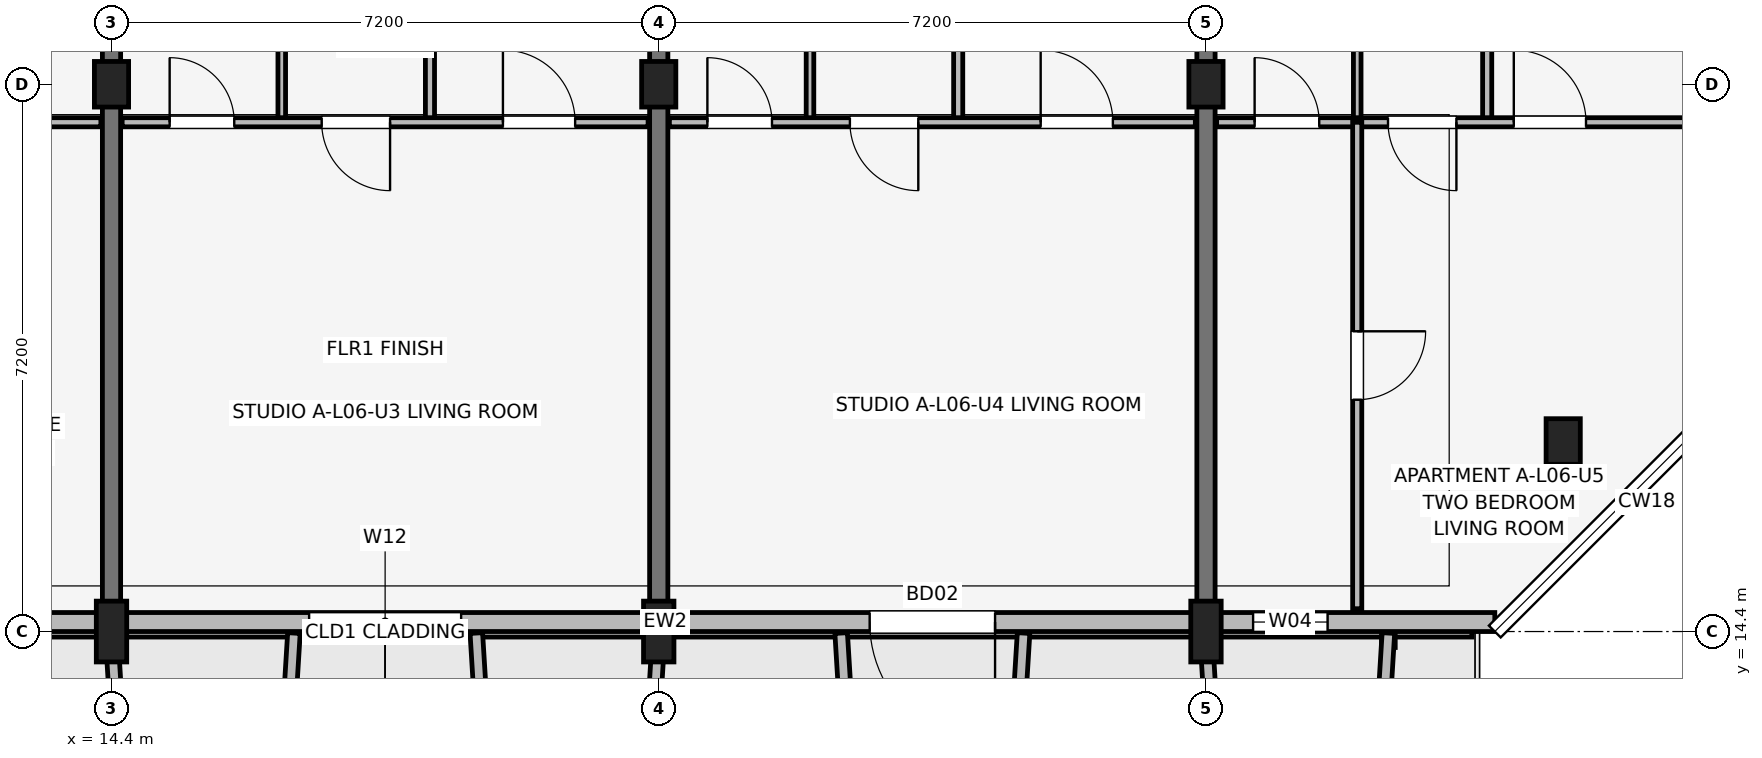
"""IFC4 building model, lengths in metres.
Left out: names, types, materials, properties, quantities, classifications, styles, units other than length and angle.
Written with IfcOpenShell. Run it as: python <this file> out.ifc"""

import sys

from ifc_helpers import new_model, si_unit, direction, frame, frame_2d, origin, origin_2d, place, context, subcontext, project, spatial, rectangle, extrude, element, fill, save


model = new_model("IFC4")
c1 = context("Model", 3, precision=1e-05, world=origin(), true_north=direction((0.0, 1.0)))
c2 = subcontext(c1, "Body", "Model", "MODEL_VIEW")
j1 = project(units=[si_unit("LENGTHUNIT", "METRE"), si_unit("PLANEANGLEUNIT", "RADIAN")], contexts=[c1])
p1 = place(None, origin())
s1 = spatial("IfcSite", under=j1, at=p1, CompositionType="ELEMENT")
p2 = place(p1, origin())
s2 = spatial("IfcBuilding", under=s1, at=p2, CompositionType="ELEMENT")
p3 = place(p2, frame((0.0, 0.0, 21.3)))
s3 = spatial("IfcBuildingStorey", under=s2, at=p3, CompositionType="ELEMENT", Elevation=21.3)
p4 = place(p3, frame((14.4, 14.4, 0.0), z_axis=(0.0, 0.0, 1.0), x_axis=(1.0, 0.0, 0.0)))
e1 = element("IfcColumn", 1, at=p4, inside=s3, PredefinedType="COLUMN", context=c2, shape_type="SweptSolid", body=[
    extrude(rectangle(XDim=0.4, YDim=0.8, at=origin_2d()), origin(), (0.0, 0.0, 1.0), 3.15),
])
p5 = place(p3, frame((14.4, 21.6, 0.0), z_axis=(0.0, 0.0, 1.0), x_axis=(1.0, 0.0, 0.0)))
e2 = element("IfcColumn", 2, at=p5, inside=s3, PredefinedType="COLUMN", context=c2, shape_type="SweptSolid", body=[
    extrude(rectangle(XDim=0.45, YDim=0.6, at=origin_2d()), origin(), (0.0, 0.0, 1.0), 3.15),
])
p6 = place(p3, frame((21.6, 14.4, 0.0), z_axis=(0.0, 0.0, 1.0), x_axis=(1.0, 0.0, 0.0)))
e3 = element("IfcColumn", 3, at=p6, inside=s3, PredefinedType="COLUMN", context=c2, shape_type="SweptSolid", body=[
    extrude(rectangle(XDim=0.4, YDim=0.8, at=origin_2d()), origin(), (0.0, 0.0, 1.0), 3.15),
])
p7 = place(p3, frame((21.6, 21.6, 0.0), z_axis=(0.0, 0.0, 1.0), x_axis=(1.0, 0.0, 0.0)))
e4 = element("IfcColumn", 4, at=p7, inside=s3, PredefinedType="COLUMN", context=c2, shape_type="SweptSolid", body=[
    extrude(rectangle(XDim=0.45, YDim=0.6, at=origin_2d()), origin(), (0.0, 0.0, 1.0), 3.15),
])
p8 = place(p3, frame((28.8, 14.4, 0.0), z_axis=(0.0, 0.0, 1.0), x_axis=(1.0, 0.0, 0.0)))
e5 = element("IfcColumn", 5, at=p8, inside=s3, PredefinedType="COLUMN", context=c2, shape_type="SweptSolid", body=[
    extrude(rectangle(XDim=0.4, YDim=0.8, at=origin_2d()), origin(), (0.0, 0.0, 1.0), 3.15),
])
for number, where, z_axis, x_axis in (
    (6, (28.8, 21.6, 0.0), (0.0, 0.0, 1.0), (1.0, 0.0, 0.0)),
    (7, (33.5, 16.9, 0.0), (0.0, 0.0, 1.0), (1.0, 0.0, 0.0)),
):
    element("IfcColumn", number, at=place(p3, frame(where, z_axis=z_axis, x_axis=x_axis)), inside=s3, PredefinedType="COLUMN", context=c2, shape_type="SweptSolid", body=[
        extrude(rectangle(XDim=0.45, YDim=0.6, at=origin_2d()), origin(), (0.0, 0.0, 1.0), 3.15),
    ])
for number, where, z_axis, x_axis in (
    (8, (14.4, 14.75, 0.0), (0.0, 0.0, 1.0), (0.0, 1.0, 0.0)),
    (9, (21.6, 14.75, 0.0), (0.0, 0.0, 1.0), (0.0, 1.0, 0.0)),
    (10, (28.8, 14.75, 0.0), (0.0, 0.0, 1.0), (0.0, 1.0, 0.0)),
):
    element("IfcWall", number, at=place(p3, frame(where, z_axis=z_axis, x_axis=x_axis)), inside=s3, PredefinedType="SHEAR", context=c2, shape_type="SweptSolid", body=[
        extrude(rectangle(XDim=9.4, YDim=0.24, at=frame_2d((4.7, 0.0))), origin(), (0.0, 0.0, 1.0), 3.15),
    ])
p9 = place(p3, frame((3.4, 14.525, 0.0), z_axis=(0.0, 0.0, 1.0), x_axis=(1.0, 0.0, 0.0)))
e11 = element("IfcWall", 11, at=p9, inside=s3, PredefinedType="SOLIDWALL", context=c2, shape_type="SweptSolid", body=[
    extrude(rectangle(XDim=29.2, YDim=0.25, at=frame_2d((14.6, 0.0))), origin(), (0.0, 0.0, 1.0), 2.43),
])
p10 = place(p9, frame((8.3, 0.0, 0.0), z_axis=(0.0, 0.0, 1.0), x_axis=(-1.0, 0.0, 0.0)))
e12 = element("IfcOpeningElement", 12, at=p10, cuts=e11, PredefinedType="OPENING", context=c2, shape_type="SweptSolid", body=[
    extrude(rectangle(XDim=1.8, YDim=2.15, at=frame_2d((0.9, 1.075))), frame((0.0, 0.135, 0.0), z_axis=(0.0, -1.0, 0.0), x_axis=(1.0, 0.0, 0.0)), (0.0, 0.0, 1.0), 0.27),
])
p11 = place(p9, frame((22.625, 0.0, 0.0), z_axis=(0.0, 0.0, 1.0), x_axis=(-1.0, 0.0, 0.0)))
e13 = element("IfcOpeningElement", 13, at=p11, cuts=e11, PredefinedType="OPENING", context=c2, shape_type="SweptSolid", body=[
    extrude(rectangle(XDim=1.65, YDim=2.15, at=frame_2d((0.825, 1.075))), frame((0.0, 0.135, 0.0), z_axis=(0.0, -1.0, 0.0), x_axis=(1.0, 0.0, 0.0)), (0.0, 0.0, 1.0), 0.27),
])
p12 = place(p9, frame((1.62, 0.0, 0.7)))
e14 = element("IfcOpeningElement", 14, at=p12, cuts=e11, PredefinedType="OPENING", context=c2, shape_type="SweptSolid", body=[
    extrude(rectangle(XDim=1.72, YDim=1.6, at=frame_2d((0.86, 0.8))), frame((0.0, 0.135, 0.0), z_axis=(0.0, -1.0, 0.0), x_axis=(1.0, 0.0, 0.0)), (0.0, 0.0, 1.0), 0.27),
])
p13 = place(p9, frame((4.675, 0.0, 0.75)))
e15 = element("IfcOpeningElement", 15, at=p13, cuts=e11, PredefinedType="OPENING", context=c2, shape_type="SweptSolid", body=[
    extrude(rectangle(XDim=0.72, YDim=1.35, at=frame_2d((0.36, 0.675))), frame((0.0, 0.135, 0.0), z_axis=(0.0, -1.0, 0.0), x_axis=(1.0, 0.0, 0.0)), (0.0, 0.0, 1.0), 0.27),
])
p14 = place(p9, frame((13.6, 0.0, 0.67)))
e16 = element("IfcOpeningElement", 16, at=p14, cuts=e11, PredefinedType="OPENING", context=c2, shape_type="SweptSolid", body=[
    extrude(rectangle(XDim=2.0, YDim=1.65, at=frame_2d((1.0, 0.825))), frame((0.0, 0.135, 0.0), z_axis=(0.0, -1.0, 0.0), x_axis=(1.0, 0.0, 0.0)), (0.0, 0.0, 1.0), 0.27),
])
p15 = place(p9, frame((26.02, 0.0, 0.75)))
e17 = element("IfcOpeningElement", 17, at=p15, cuts=e11, PredefinedType="OPENING", context=c2, shape_type="SweptSolid", body=[
    extrude(rectangle(XDim=0.98, YDim=1.45, at=frame_2d((0.49, 0.725))), frame((0.0, 0.135, 0.0), z_axis=(0.0, -1.0, 0.0), x_axis=(1.0, 0.0, 0.0)), (0.0, 0.0, 1.0), 0.27),
])
for number, where, z_axis, x_axis in (
    (18, (14.4, 14.38, 0.0), (0.0, 0.0, 1.0), (0.061, -0.998, 0.0)),
    (19, (16.8, 14.38, 0.0), (0.0, 0.0, 1.0), (-0.061, -0.998, 0.0)),
    (20, (19.2, 14.38, 0.0), (0.0, 0.0, 1.0), (0.061, -0.998, 0.0)),
    (21, (21.6, 14.38, 0.0), (0.0, 0.0, 1.0), (-0.061, -0.998, 0.0)),
):
    element("IfcWall", number, at=place(p3, frame(where, z_axis=z_axis, x_axis=x_axis)), inside=s3, PredefinedType="ELEMENTEDWALL", context=c2, shape_type="SweptSolid", body=[
        extrude(rectangle(XDim=1.964, YDim=0.165, at=frame_2d((0.982, 0.0))), origin(), (0.0, 0.0, 1.0), 2.53),
    ])
for number, where, z_axis, x_axis in (
    (22, (24.0, 14.38, 0.0), (0.0, 0.0, 1.0), (0.061, -0.998, 0.0)),
    (23, (26.4, 14.38, 0.0), (0.0, 0.0, 1.0), (-0.061, -0.998, 0.0)),
):
    element("IfcWall", number, at=place(p3, frame(where, z_axis=z_axis, x_axis=x_axis)), inside=s3, PredefinedType="ELEMENTEDWALL", context=c2, shape_type="SweptSolid", body=[
        extrude(rectangle(XDim=1.964, YDim=0.165, at=frame_2d((0.982, 0.0))), origin(), (0.0, 0.0, 1.0), 2.55),
    ])
for number, where, z_axis, x_axis in (
    (24, (28.8, 14.38, 0.0), (0.0, 0.0, 1.0), (0.061, -0.998, 0.0)),
    (25, (31.2, 14.38, 0.0), (0.0, 0.0, 1.0), (-0.061, -0.998, 0.0)),
):
    element("IfcWall", number, at=place(p3, frame(where, z_axis=z_axis, x_axis=x_axis)), inside=s3, PredefinedType="ELEMENTEDWALL", context=c2, shape_type="SweptSolid", body=[
        extrude(rectangle(XDim=1.964, YDim=0.165, at=frame_2d((0.982, 0.0))), origin(), (0.0, 0.0, 1.0), 2.95),
    ])
p16 = place(p3, frame((7.34, 21.1, 0.0), z_axis=(0.0, 0.0, 1.0), x_axis=(1.0, 0.0, 0.0)))
e26 = element("IfcWall", 26, at=p16, inside=s3, PredefinedType="PARTITIONING", context=c2, shape_type="SweptSolid", body=[
    extrude(rectangle(XDim=6.92, YDim=0.12, at=frame_2d((3.46, 0.0))), origin(), (0.0, 0.0, 1.0), 2.38),
])
p17 = place(p16, frame((1.475, 0.0, 0.0), z_axis=(0.0, 0.0, 1.0), x_axis=(-1.0, 0.0, 0.0)))
e27 = element("IfcOpeningElement", 27, at=p17, cuts=e26, PredefinedType="OPENING", context=c2, shape_type="SweptSolid", body=[
    extrude(rectangle(XDim=0.85, YDim=2.08, at=frame_2d((0.425, 1.04))), frame((0.0, 0.07, 0.0), z_axis=(0.0, -1.0, 0.0), x_axis=(1.0, 0.0, 0.0)), (0.0, 0.0, 1.0), 0.14),
])
p18 = place(p16, frame((2.775, 0.0, 0.0)))
e28 = element("IfcOpeningElement", 28, at=p18, cuts=e26, PredefinedType="OPENING", context=c2, shape_type="SweptSolid", body=[
    extrude(rectangle(XDim=0.9, YDim=2.08, at=frame_2d((0.45, 1.04))), frame((0.0, 0.07, 0.0), z_axis=(0.0, -1.0, 0.0), x_axis=(1.0, 0.0, 0.0)), (0.0, 0.0, 1.0), 0.14),
])
p19 = place(p16, frame((6.11, 0.0, 0.0), z_axis=(0.0, 0.0, 1.0), x_axis=(-1.0, 0.0, 0.0)))
e29 = element("IfcOpeningElement", 29, at=p19, cuts=e26, PredefinedType="OPENING", context=c2, shape_type="SweptSolid", body=[
    extrude(rectangle(XDim=0.95, YDim=2.08, at=frame_2d((0.475, 1.04))), frame((0.0, 0.07, 0.0), z_axis=(0.0, -1.0, 0.0), x_axis=(1.0, 0.0, 0.0)), (0.0, 0.0, 1.0), 0.14),
])
p20 = place(p3, frame((16.64, 21.1, 0.0), z_axis=(0.0, 0.0, 1.0), x_axis=(0.0, 1.0, 0.0)))
e30 = element("IfcWall", 30, at=p20, inside=s3, PredefinedType="PARTITIONING", context=c2, shape_type="SweptSolid", body=[
    extrude(rectangle(XDim=3.2, YDim=0.1, at=frame_2d((1.6, 0.0))), origin(), (0.0, 0.0, 1.0), 2.38),
])
p21 = place(p3, frame((18.59, 21.1, 0.0), z_axis=(0.0, 0.0, 1.0), x_axis=(0.0, 1.0, 0.0)))
e31 = element("IfcWall", 31, at=p21, inside=s3, PredefinedType="PARTITIONING", context=c2, shape_type="SweptSolid", body=[
    extrude(rectangle(XDim=3.2, YDim=0.12, at=frame_2d((1.6, 0.0))), origin(), (0.0, 0.0, 1.0), 2.38),
])
p22 = place(p3, frame((14.54, 21.1, 0.0), z_axis=(0.0, 0.0, 1.0), x_axis=(1.0, 0.0, 0.0)))
e32 = element("IfcWall", 32, at=p22, inside=s3, PredefinedType="PARTITIONING", context=c2, shape_type="SweptSolid", body=[
    extrude(rectangle(XDim=6.92, YDim=0.12, at=frame_2d((3.46, 0.0))), origin(), (0.0, 0.0, 1.0), 2.38),
])
p23 = place(p22, frame((0.625, 0.0, 0.0)))
e33 = element("IfcOpeningElement", 33, at=p23, cuts=e32, PredefinedType="OPENING", context=c2, shape_type="SweptSolid", body=[
    extrude(rectangle(XDim=0.85, YDim=2.08, at=frame_2d((0.425, 1.04))), frame((0.0, 0.07, 0.0), z_axis=(0.0, -1.0, 0.0), x_axis=(1.0, 0.0, 0.0)), (0.0, 0.0, 1.0), 0.14),
])
p24 = place(p22, frame((3.525, 0.0, 0.0), z_axis=(0.0, 0.0, 1.0), x_axis=(-1.0, 0.0, 0.0)))
e34 = element("IfcOpeningElement", 34, at=p24, cuts=e32, PredefinedType="OPENING", context=c2, shape_type="SweptSolid", body=[
    extrude(rectangle(XDim=0.9, YDim=2.08, at=frame_2d((0.45, 1.04))), frame((0.0, 0.07, 0.0), z_axis=(0.0, -1.0, 0.0), x_axis=(1.0, 0.0, 0.0)), (0.0, 0.0, 1.0), 0.14),
])
p25 = place(p22, frame((5.01, 0.0, 0.0)))
e35 = element("IfcOpeningElement", 35, at=p25, cuts=e32, PredefinedType="OPENING", context=c2, shape_type="SweptSolid", body=[
    extrude(rectangle(XDim=0.95, YDim=2.08, at=frame_2d((0.475, 1.04))), frame((0.0, 0.07, 0.0), z_axis=(0.0, -1.0, 0.0), x_axis=(1.0, 0.0, 0.0)), (0.0, 0.0, 1.0), 0.14),
])
p26 = place(p3, frame((23.59, 21.1, 0.0), z_axis=(0.0, 0.0, 1.0), x_axis=(0.0, 1.0, 0.0)))
e36 = element("IfcWall", 36, at=p26, inside=s3, PredefinedType="PARTITIONING", context=c2, shape_type="SweptSolid", body=[
    extrude(rectangle(XDim=3.2, YDim=0.1, at=frame_2d((1.6, 0.0))), origin(), (0.0, 0.0, 1.0), 2.38),
])
p27 = place(p3, frame((25.54, 21.1, 0.0), z_axis=(0.0, 0.0, 1.0), x_axis=(0.0, 1.0, 0.0)))
e37 = element("IfcWall", 37, at=p27, inside=s3, PredefinedType="PARTITIONING", context=c2, shape_type="SweptSolid", body=[
    extrude(rectangle(XDim=3.2, YDim=0.12, at=frame_2d((1.6, 0.0))), origin(), (0.0, 0.0, 1.0), 2.38),
])
p28 = place(p3, frame((21.74, 21.1, 0.0), z_axis=(0.0, 0.0, 1.0), x_axis=(1.0, 0.0, 0.0)))
e38 = element("IfcWall", 38, at=p28, inside=s3, PredefinedType="PARTITIONING", context=c2, shape_type="SweptSolid", body=[
    extrude(rectangle(XDim=6.92, YDim=0.12, at=frame_2d((3.46, 0.0))), origin(), (0.0, 0.0, 1.0), 2.38),
])
p29 = place(p28, frame((0.5, 0.0, 0.0)))
e39 = element("IfcOpeningElement", 39, at=p29, cuts=e38, PredefinedType="OPENING", context=c2, shape_type="SweptSolid", body=[
    extrude(rectangle(XDim=0.85, YDim=2.08, at=frame_2d((0.425, 1.04))), frame((0.0, 0.07, 0.0), z_axis=(0.0, -1.0, 0.0), x_axis=(1.0, 0.0, 0.0)), (0.0, 0.0, 1.0), 0.14),
])
p30 = place(p28, frame((3.275, 0.0, 0.0), z_axis=(0.0, 0.0, 1.0), x_axis=(-1.0, 0.0, 0.0)))
e40 = element("IfcOpeningElement", 40, at=p30, cuts=e38, PredefinedType="OPENING", context=c2, shape_type="SweptSolid", body=[
    extrude(rectangle(XDim=0.9, YDim=2.08, at=frame_2d((0.45, 1.04))), frame((0.0, 0.07, 0.0), z_axis=(0.0, -1.0, 0.0), x_axis=(1.0, 0.0, 0.0)), (0.0, 0.0, 1.0), 0.14),
])
p31 = place(p28, frame((4.885, 0.0, 0.0)))
e41 = element("IfcOpeningElement", 41, at=p31, cuts=e38, PredefinedType="OPENING", context=c2, shape_type="SweptSolid", body=[
    extrude(rectangle(XDim=0.95, YDim=2.08, at=frame_2d((0.475, 1.04))), frame((0.0, 0.07, 0.0), z_axis=(0.0, -1.0, 0.0), x_axis=(1.0, 0.0, 0.0)), (0.0, 0.0, 1.0), 0.14),
])
p32 = place(p3, frame((30.79, 21.1, 0.0), z_axis=(0.0, 0.0, 1.0), x_axis=(0.0, 1.0, 0.0)))
e42 = element("IfcWall", 42, at=p32, inside=s3, PredefinedType="PARTITIONING", context=c2, shape_type="SweptSolid", body=[
    extrude(rectangle(XDim=3.2, YDim=0.1, at=frame_2d((1.6, 0.0))), origin(), (0.0, 0.0, 1.0), 2.38),
])
p33 = place(p3, frame((32.5, 21.1, 0.0), z_axis=(0.0, 0.0, 1.0), x_axis=(0.0, 1.0, 0.0)))
e43 = element("IfcWall", 43, at=p33, inside=s3, PredefinedType="PARTITIONING", context=c2, shape_type="SweptSolid", body=[
    extrude(rectangle(XDim=3.2, YDim=0.12, at=frame_2d((1.6, 0.0))), origin(), (0.0, 0.0, 1.0), 2.38),
])
p34 = place(p3, frame((28.94, 21.1, 0.0), z_axis=(0.0, 0.0, 1.0), x_axis=(1.0, 0.0, 0.0)))
e44 = element("IfcWall", 44, at=p34, inside=s3, PredefinedType="PARTITIONING", context=c2, shape_type="SweptSolid", body=[
    extrude(rectangle(XDim=6.92, YDim=0.12, at=frame_2d((3.46, 0.0))), origin(), (0.0, 0.0, 1.0), 2.38),
])
p35 = place(p34, frame((0.5, 0.0, 0.0)))
e45 = element("IfcOpeningElement", 45, at=p35, cuts=e44, PredefinedType="OPENING", context=c2, shape_type="SweptSolid", body=[
    extrude(rectangle(XDim=0.85, YDim=2.08, at=frame_2d((0.425, 1.04))), frame((0.0, 0.07, 0.0), z_axis=(0.0, -1.0, 0.0), x_axis=(1.0, 0.0, 0.0)), (0.0, 0.0, 1.0), 0.14),
])
p36 = place(p34, frame((3.155, 0.0, 0.0), z_axis=(0.0, 0.0, 1.0), x_axis=(-1.0, 0.0, 0.0)))
e46 = element("IfcOpeningElement", 46, at=p36, cuts=e44, PredefinedType="OPENING", context=c2, shape_type="SweptSolid", body=[
    extrude(rectangle(XDim=0.9, YDim=2.08, at=frame_2d((0.45, 1.04))), frame((0.0, 0.07, 0.0), z_axis=(0.0, -1.0, 0.0), x_axis=(1.0, 0.0, 0.0)), (0.0, 0.0, 1.0), 0.14),
])
p37 = place(p34, frame((3.91, 0.0, 0.0)))
e47 = element("IfcOpeningElement", 47, at=p37, cuts=e44, PredefinedType="OPENING", context=c2, shape_type="SweptSolid", body=[
    extrude(rectangle(XDim=0.95, YDim=2.08, at=frame_2d((0.475, 1.04))), frame((0.0, 0.07, 0.0), z_axis=(0.0, -1.0, 0.0), x_axis=(1.0, 0.0, 0.0)), (0.0, 0.0, 1.0), 0.14),
])
p38 = place(p3, frame((30.79, 14.7, 0.0), z_axis=(0.0, 0.0, 1.0), x_axis=(0.0, 1.0, 0.0)))
e48 = element("IfcWall", 48, at=p38, inside=s3, PredefinedType="PARTITIONING", context=c2, shape_type="SweptSolid", body=[
    extrude(rectangle(XDim=6.4, YDim=0.12, at=frame_2d((3.2, 0.0))), origin(), (0.0, 0.0, 1.0), 2.38),
])
p39 = place(p38, frame((3.65, 0.0, 0.0), z_axis=(0.0, 0.0, 1.0), x_axis=(-1.0, 0.0, 0.0)))
e49 = element("IfcOpeningElement", 49, at=p39, cuts=e48, PredefinedType="OPENING", context=c2, shape_type="SweptSolid", body=[
    extrude(rectangle(XDim=0.9, YDim=2.08, at=frame_2d((0.45, 1.04))), frame((0.0, 0.07, 0.0), z_axis=(0.0, -1.0, 0.0), x_axis=(1.0, 0.0, 0.0)), (0.0, 0.0, 1.0), 0.14),
])
p40 = place(p11, origin())
e50 = element("IfcDoor", 50, at=p40, inside=s3, OperationType="SINGLE_SWING_RIGHT", PredefinedType="DOOR", context=c2, shape_type="SweptSolid", body=[
    extrude(rectangle(XDim=1.65, YDim=2.15, at=frame_2d((0.825, 1.075))), frame((0.0, 0.025, 0.0), z_axis=(0.0, -1.0, 0.0), x_axis=(1.0, 0.0, 0.0)), (0.0, 0.0, 1.0), 0.05),
])
fill(e13, e50)
p41 = place(p14, origin())
e51 = element("IfcWindow", 51, at=p41, inside=s3, PartitioningType="SINGLE_PANEL", PredefinedType="WINDOW", context=c2, shape_type="SweptSolid", body=[
    extrude(rectangle(XDim=2.0, YDim=1.65, at=frame_2d((1.0, 0.825))), frame((0.0, 0.03, 0.0), z_axis=(0.0, -1.0, 0.0), x_axis=(1.0, 0.0, 0.0)), (0.0, 0.0, 1.0), 0.06),
])
fill(e16, e51)
p42 = place(p15, origin())
e52 = element("IfcWindow", 52, at=p42, inside=s3, PartitioningType="SINGLE_PANEL", PredefinedType="WINDOW", context=c2, shape_type="SweptSolid", body=[
    extrude(rectangle(XDim=0.98, YDim=1.45, at=frame_2d((0.49, 0.725))), frame((0.0, 0.03, 0.0), z_axis=(0.0, -1.0, 0.0), x_axis=(1.0, 0.0, 0.0)), (0.0, 0.0, 1.0), 0.06),
])
fill(e17, e52)
p43 = place(p23, origin())
e53 = element("IfcDoor", 53, at=p43, inside=s3, OperationType="SINGLE_SWING_LEFT", PredefinedType="DOOR", context=c2, shape_type="SweptSolid", body=[
    extrude(rectangle(XDim=0.85, YDim=2.08, at=frame_2d((0.425, 1.04))), frame((0.0, 0.025, 0.0), z_axis=(0.0, -1.0, 0.0), x_axis=(1.0, 0.0, 0.0)), (0.0, 0.0, 1.0), 0.05),
])
fill(e33, e53)
p44 = place(p24, origin())
e54 = element("IfcDoor", 54, at=p44, inside=s3, OperationType="SINGLE_SWING_RIGHT", PredefinedType="DOOR", context=c2, shape_type="SweptSolid", body=[
    extrude(rectangle(XDim=0.9, YDim=2.08, at=frame_2d((0.45, 1.04))), frame((0.0, 0.025, 0.0), z_axis=(0.0, -1.0, 0.0), x_axis=(1.0, 0.0, 0.0)), (0.0, 0.0, 1.0), 0.05),
])
fill(e34, e54)
p45 = place(p25, origin())
e55 = element("IfcDoor", 55, at=p45, inside=s3, OperationType="SINGLE_SWING_LEFT", PredefinedType="DOOR", context=c2, shape_type="SweptSolid", body=[
    extrude(rectangle(XDim=0.95, YDim=2.08, at=frame_2d((0.475, 1.04))), frame((0.0, 0.025, 0.0), z_axis=(0.0, -1.0, 0.0), x_axis=(1.0, 0.0, 0.0)), (0.0, 0.0, 1.0), 0.05),
])
fill(e35, e55)
p46 = place(p29, origin())
e56 = element("IfcDoor", 56, at=p46, inside=s3, OperationType="SINGLE_SWING_LEFT", PredefinedType="DOOR", context=c2, shape_type="SweptSolid", body=[
    extrude(rectangle(XDim=0.85, YDim=2.08, at=frame_2d((0.425, 1.04))), frame((0.0, 0.025, 0.0), z_axis=(0.0, -1.0, 0.0), x_axis=(1.0, 0.0, 0.0)), (0.0, 0.0, 1.0), 0.05),
])
fill(e39, e56)
p47 = place(p30, origin())
e57 = element("IfcDoor", 57, at=p47, inside=s3, OperationType="SINGLE_SWING_RIGHT", PredefinedType="DOOR", context=c2, shape_type="SweptSolid", body=[
    extrude(rectangle(XDim=0.9, YDim=2.08, at=frame_2d((0.45, 1.04))), frame((0.0, 0.025, 0.0), z_axis=(0.0, -1.0, 0.0), x_axis=(1.0, 0.0, 0.0)), (0.0, 0.0, 1.0), 0.05),
])
fill(e40, e57)
p48 = place(p31, origin())
e58 = element("IfcDoor", 58, at=p48, inside=s3, OperationType="SINGLE_SWING_LEFT", PredefinedType="DOOR", context=c2, shape_type="SweptSolid", body=[
    extrude(rectangle(XDim=0.95, YDim=2.08, at=frame_2d((0.475, 1.04))), frame((0.0, 0.025, 0.0), z_axis=(0.0, -1.0, 0.0), x_axis=(1.0, 0.0, 0.0)), (0.0, 0.0, 1.0), 0.05),
])
fill(e41, e58)
p49 = place(p35, origin())
e59 = element("IfcDoor", 59, at=p49, inside=s3, OperationType="SINGLE_SWING_LEFT", PredefinedType="DOOR", context=c2, shape_type="SweptSolid", body=[
    extrude(rectangle(XDim=0.85, YDim=2.08, at=frame_2d((0.425, 1.04))), frame((0.0, 0.025, 0.0), z_axis=(0.0, -1.0, 0.0), x_axis=(1.0, 0.0, 0.0)), (0.0, 0.0, 1.0), 0.05),
])
fill(e45, e59)
p50 = place(p36, origin())
e60 = element("IfcDoor", 60, at=p50, inside=s3, OperationType="SINGLE_SWING_RIGHT", PredefinedType="DOOR", context=c2, shape_type="SweptSolid", body=[
    extrude(rectangle(XDim=0.9, YDim=2.08, at=frame_2d((0.45, 1.04))), frame((0.0, 0.025, 0.0), z_axis=(0.0, -1.0, 0.0), x_axis=(1.0, 0.0, 0.0)), (0.0, 0.0, 1.0), 0.05),
])
fill(e46, e60)
p51 = place(p37, origin())
e61 = element("IfcDoor", 61, at=p51, inside=s3, OperationType="SINGLE_SWING_LEFT", PredefinedType="DOOR", context=c2, shape_type="SweptSolid", body=[
    extrude(rectangle(XDim=0.95, YDim=2.08, at=frame_2d((0.475, 1.04))), frame((0.0, 0.025, 0.0), z_axis=(0.0, -1.0, 0.0), x_axis=(1.0, 0.0, 0.0)), (0.0, 0.0, 1.0), 0.05),
])
fill(e47, e61)
p52 = place(p39, origin())
e62 = element("IfcDoor", 62, at=p52, inside=s3, OperationType="SINGLE_SWING_RIGHT", PredefinedType="DOOR", context=c2, shape_type="SweptSolid", body=[
    extrude(rectangle(XDim=0.9, YDim=2.08, at=frame_2d((0.45, 1.04))), frame((0.0, 0.025, 0.0), z_axis=(0.0, -1.0, 0.0), x_axis=(1.0, 0.0, 0.0)), (0.0, 0.0, 1.0), 0.05),
])
fill(e49, e62)
save(model, sys.argv[1])
